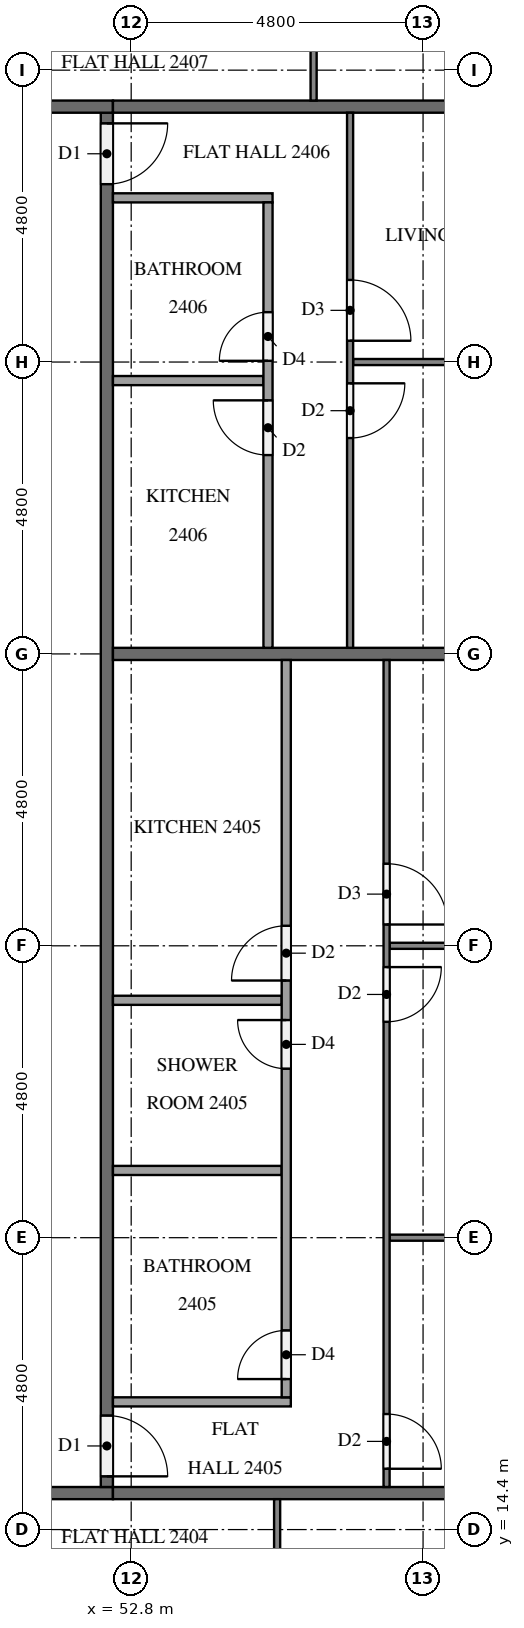
"""IFC4 building model, lengths in metres.
Left out: names, types, materials, properties, quantities, classifications, styles, units other than length and angle.
Written with IfcOpenShell. Run it as: python <this file> out.ifc"""

import sys

from ifc_helpers import new_model, si_unit, direction, frame, frame_2d, origin, place, context, subcontext, project, spatial, rectangle, extrude, element, fill, save


model = new_model("IFC4")
c1 = context("Model", 3, precision=1e-05, world=origin(), true_north=direction((0.0, 1.0)))
c2 = subcontext(c1, "Body", "Model", "MODEL_VIEW")
j1 = project(units=[si_unit("LENGTHUNIT", "METRE"), si_unit("PLANEANGLEUNIT", "RADIAN")], contexts=[c1])
p1 = place(None, origin())
s1 = spatial("IfcSite", under=j1, at=p1, CompositionType="ELEMENT")
p2 = place(p1, origin())
s2 = spatial("IfcBuilding", under=s1, at=p2, CompositionType="ELEMENT")
p3 = place(p2, frame((0.0, 0.0, 96.2)))
s3 = spatial("IfcBuildingStorey", under=s2, at=p3, CompositionType="ELEMENT", Elevation=96.2)
p4 = place(p3, frame((50.3, 15.0, 0.0), z_axis=(0.0, 0.0, 1.0), x_axis=(1.0, 0.0, 0.0)))
e1 = element("IfcWall", 1, at=p4, inside=s3, PredefinedType="PARTITIONING", context=c2, shape_type="SweptSolid", body=[
    extrude(rectangle(XDim=2.2, YDim=0.2, at=frame_2d((1.1, 0.0))), origin(), (0.0, 0.0, 1.0), 3.2),
])
p5 = place(p3, frame((52.4, 37.7, 0.0), z_axis=(0.0, 0.0, 1.0), x_axis=(0.0, -1.0, 0.0)))
e2 = element("IfcWall", 2, at=p5, inside=s3, PredefinedType="PARTITIONING", context=c2, shape_type="SweptSolid", body=[
    extrude(rectangle(XDim=22.6, YDim=0.2, at=frame_2d((11.3, 0.0))), origin(), (0.0, 0.0, 1.0), 3.2),
])
p6 = place(p5, frame((21.425, 0.0, 0.0)))
e3 = element("IfcOpeningElement", 3, at=p6, cuts=e2, PredefinedType="OPENING", context=c2, shape_type="SweptSolid", body=[
    extrude(rectangle(XDim=1.0, YDim=2.1, at=frame_2d((0.5, 1.05))), frame((0.0, 0.11, 0.0), z_axis=(0.0, -1.0, 0.0), x_axis=(1.0, 0.0, 0.0)), (0.0, 0.0, 1.0), 0.22),
])
p7 = place(p5, frame((0.175, 0.0, 0.0)))
e4 = element("IfcOpeningElement", 4, at=p7, cuts=e2, PredefinedType="OPENING", context=c2, shape_type="SweptSolid", body=[
    extrude(rectangle(XDim=1.0, YDim=2.1, at=frame_2d((0.5, 1.05))), frame((0.0, 0.11, 0.0), z_axis=(0.0, -1.0, 0.0), x_axis=(1.0, 0.0, 0.0)), (0.0, 0.0, 1.0), 0.22),
])
p8 = place(p3, frame((52.5, 37.8, 0.0), z_axis=(0.0, 0.0, 1.0), x_axis=(-1.0, 0.0, 0.0)))
e5 = element("IfcWall", 5, at=p8, inside=s3, PredefinedType="PARTITIONING", context=c2, shape_type="SweptSolid", body=[
    extrude(rectangle(XDim=2.2, YDim=0.2, at=frame_2d((1.1, 0.0))), origin(), (0.0, 0.0, 1.0), 3.2),
])
p9 = place(p3, frame((52.5, 15.0, 0.0), z_axis=(0.0, 0.0, 1.0), x_axis=(1.0, 0.0, 0.0)))
e6 = element("IfcWall", 6, at=p9, inside=s3, PredefinedType="PARTITIONING", context=c2, shape_type="SweptSolid", body=[
    extrude(rectangle(XDim=9.8, YDim=0.2, at=frame_2d((4.9, 0.0))), origin(), (0.0, 0.0, 1.0), 3.2),
])
for number, where, z_axis, x_axis in (
    (7, (52.5, 28.8, 0.0), (0.0, 0.0, 1.0), (1.0, 0.0, 0.0)),
    (8, (52.5, 37.8, 0.0), (0.0, 0.0, 1.0), (1.0, 0.0, 0.0)),
):
    element("IfcWall", number, at=place(p3, frame(where, z_axis=z_axis, x_axis=x_axis)), inside=s3, PredefinedType="PARTITIONING", context=c2, shape_type="SweptSolid", body=[
        extrude(rectangle(XDim=9.475, YDim=0.2, at=frame_2d((4.738, 0.0))), origin(), (0.0, 0.0, 1.0), 3.2),
    ])
p10 = place(p3, frame((55.2, 14.9, 0.0), z_axis=(0.0, 0.0, 1.0), x_axis=(0.0, -1.0, 0.0)))
e9 = element("IfcWall", 9, at=p10, inside=s3, PredefinedType="PARTITIONING", context=c2, shape_type="SweptSolid", body=[
    extrude(rectangle(XDim=10.0, YDim=0.1, at=frame_2d((5.0, 0.0))), origin(), (0.0, 0.0, 1.0), 3.2),
])
p11 = place(p10, frame((4.05, 0.0, 0.0)))
e10 = element("IfcOpeningElement", 10, at=p11, cuts=e9, PredefinedType="OPENING", context=c2, shape_type="SweptSolid", body=[
    extrude(rectangle(XDim=0.9, YDim=2.1, at=frame_2d((0.45, 1.05))), frame((0.0, 0.06, 0.0), z_axis=(0.0, -1.0, 0.0), x_axis=(1.0, 0.0, 0.0)), (0.0, 0.0, 1.0), 0.12),
])
p12 = place(p10, frame((5.65, 0.0, 0.0)))
e11 = element("IfcOpeningElement", 11, at=p12, cuts=e9, PredefinedType="OPENING", context=c2, shape_type="SweptSolid", body=[
    extrude(rectangle(XDim=1.0, YDim=2.1, at=frame_2d((0.5, 1.05))), frame((0.0, 0.06, 0.0), z_axis=(0.0, -1.0, 0.0), x_axis=(1.0, 0.0, 0.0)), (0.0, 0.0, 1.0), 0.12),
])
p13 = place(p3, frame((57.05, 19.2, 0.0), z_axis=(0.0, 0.0, 1.0), x_axis=(1.0, 0.0, 0.0)))
e12 = element("IfcWall", 12, at=p13, inside=s3, PredefinedType="PARTITIONING", context=c2, shape_type="SweptSolid", body=[
    extrude(rectangle(XDim=4.925, YDim=0.1, at=frame_2d((2.462, 0.0))), origin(), (0.0, 0.0, 1.0), 3.2),
])
p14 = place(p3, frame((57.05, 24.0, 0.0), z_axis=(0.0, 0.0, 1.0), x_axis=(1.0, 0.0, 0.0)))
e13 = element("IfcWall", 13, at=p14, inside=s3, PredefinedType="PARTITIONING", context=c2, shape_type="SweptSolid", body=[
    extrude(rectangle(XDim=5.25, YDim=0.1, at=frame_2d((2.625, 0.0))), origin(), (0.0, 0.0, 1.0), 3.2),
])
p15 = place(p3, frame((57.0, 28.7, 0.0), z_axis=(0.0, 0.0, 1.0), x_axis=(0.0, -1.0, 0.0)))
e14 = element("IfcWall", 14, at=p15, inside=s3, PredefinedType="PARTITIONING", context=c2, shape_type="SweptSolid", body=[
    extrude(rectangle(XDim=13.6, YDim=0.1, at=frame_2d((6.8, 0.0))), origin(), (0.0, 0.0, 1.0), 3.2),
])
p16 = place(p15, frame((12.4, 0.0, 0.0)))
e15 = element("IfcOpeningElement", 15, at=p16, cuts=e14, PredefinedType="OPENING", context=c2, shape_type="SweptSolid", body=[
    extrude(rectangle(XDim=0.9, YDim=2.1, at=frame_2d((0.45, 1.05))), frame((0.0, 0.06, 0.0), z_axis=(0.0, -1.0, 0.0), x_axis=(1.0, 0.0, 0.0)), (0.0, 0.0, 1.0), 0.12),
])
p17 = place(p15, frame((5.05, 0.0, 0.0)))
e16 = element("IfcOpeningElement", 16, at=p17, cuts=e14, PredefinedType="OPENING", context=c2, shape_type="SweptSolid", body=[
    extrude(rectangle(XDim=0.9, YDim=2.1, at=frame_2d((0.45, 1.05))), frame((0.0, 0.06, 0.0), z_axis=(0.0, -1.0, 0.0), x_axis=(1.0, 0.0, 0.0)), (0.0, 0.0, 1.0), 0.12),
])
p18 = place(p15, frame((3.35, 0.0, 0.0)))
e17 = element("IfcOpeningElement", 17, at=p18, cuts=e14, PredefinedType="OPENING", context=c2, shape_type="SweptSolid", body=[
    extrude(rectangle(XDim=1.0, YDim=2.1, at=frame_2d((0.5, 1.05))), frame((0.0, 0.06, 0.0), z_axis=(0.0, -1.0, 0.0), x_axis=(1.0, 0.0, 0.0)), (0.0, 0.0, 1.0), 0.12),
])
for number, where, z_axis, x_axis in (
    (18, (52.5, 20.306, 0.0), (0.0, 0.0, 1.0), (1.0, 0.0, 0.0)),
    (19, (52.5, 23.104, 0.0), (0.0, 0.0, 1.0), (1.0, 0.0, 0.0)),
):
    element("IfcWall", number, at=place(p3, frame(where, z_axis=z_axis, x_axis=x_axis)), inside=s3, PredefinedType="PARTITIONING", context=c2, shape_type="SweptSolid", body=[
        extrude(rectangle(XDim=2.775, YDim=0.15, at=frame_2d((1.387, 0.0))), origin(), (0.0, 0.0, 1.0), 3.2),
    ])
p19 = place(p3, frame((52.5, 16.5, 0.0), z_axis=(0.0, 0.0, 1.0), x_axis=(1.0, 0.0, 0.0)))
e20 = element("IfcWall", 20, at=p19, inside=s3, PredefinedType="PARTITIONING", context=c2, shape_type="SweptSolid", body=[
    extrude(rectangle(XDim=2.925, YDim=0.15, at=frame_2d((1.462, 0.0))), origin(), (0.0, 0.0, 1.0), 3.2),
])
p20 = place(p3, frame((55.35, 16.575, 0.0), z_axis=(0.0, 0.0, 1.0), x_axis=(0.0, 1.0, 0.0)))
e21 = element("IfcWall", 21, at=p20, inside=s3, PredefinedType="PARTITIONING", context=c2, shape_type="SweptSolid", body=[
    extrude(rectangle(XDim=12.125, YDim=0.15, at=frame_2d((6.062, 0.0))), origin(), (0.0, 0.0, 1.0), 3.2),
])
p21 = place(p20, frame((0.3, 0.0, 0.0)))
e22 = element("IfcOpeningElement", 22, at=p21, cuts=e21, PredefinedType="OPENING", context=c2, shape_type="SweptSolid", body=[
    extrude(rectangle(XDim=0.8, YDim=2.1, at=frame_2d((0.4, 1.05))), frame((0.0, 0.085, 0.0), z_axis=(0.0, -1.0, 0.0), x_axis=(1.0, 0.0, 0.0)), (0.0, 0.0, 1.0), 0.17),
])
p22 = place(p20, frame((5.404, 0.0, 0.0)))
e23 = element("IfcOpeningElement", 23, at=p22, cuts=e21, PredefinedType="OPENING", context=c2, shape_type="SweptSolid", body=[
    extrude(rectangle(XDim=0.8, YDim=2.1, at=frame_2d((0.4, 1.05))), frame((0.0, 0.085, 0.0), z_axis=(0.0, -1.0, 0.0), x_axis=(1.0, 0.0, 0.0)), (0.0, 0.0, 1.0), 0.17),
])
p23 = place(p20, frame((6.854, 0.0, 0.0)))
e24 = element("IfcOpeningElement", 24, at=p23, cuts=e21, PredefinedType="OPENING", context=c2, shape_type="SweptSolid", body=[
    extrude(rectangle(XDim=0.9, YDim=2.1, at=frame_2d((0.45, 1.05))), frame((0.0, 0.085, 0.0), z_axis=(0.0, -1.0, 0.0), x_axis=(1.0, 0.0, 0.0)), (0.0, 0.0, 1.0), 0.17),
])
p24 = place(p3, frame((56.45, 33.6, 0.0), z_axis=(0.0, 0.0, 1.0), x_axis=(1.0, 0.0, 0.0)))
e25 = element("IfcWall", 25, at=p24, inside=s3, PredefinedType="PARTITIONING", context=c2, shape_type="SweptSolid", body=[
    extrude(rectangle(XDim=5.85, YDim=0.1, at=frame_2d((2.925, 0.0))), origin(), (0.0, 0.0, 1.0), 3.2),
])
p25 = place(p3, frame((56.4, 37.7, 0.0), z_axis=(0.0, 0.0, 1.0), x_axis=(0.0, -1.0, 0.0)))
e26 = element("IfcWall", 26, at=p25, inside=s3, PredefinedType="PARTITIONING", context=c2, shape_type="SweptSolid", body=[
    extrude(rectangle(XDim=8.8, YDim=0.1, at=frame_2d((4.4, 0.0))), origin(), (0.0, 0.0, 1.0), 3.2),
])
p26 = place(p25, frame((2.75, 0.0, 0.0)))
e27 = element("IfcOpeningElement", 27, at=p26, cuts=e26, PredefinedType="OPENING", context=c2, shape_type="SweptSolid", body=[
    extrude(rectangle(XDim=1.0, YDim=2.1, at=frame_2d((0.5, 1.05))), frame((0.0, 0.06, 0.0), z_axis=(0.0, -1.0, 0.0), x_axis=(1.0, 0.0, 0.0)), (0.0, 0.0, 1.0), 0.12),
])
p27 = place(p25, frame((4.45, 0.0, 0.0)))
e28 = element("IfcOpeningElement", 28, at=p27, cuts=e26, PredefinedType="OPENING", context=c2, shape_type="SweptSolid", body=[
    extrude(rectangle(XDim=0.9, YDim=2.1, at=frame_2d((0.45, 1.05))), frame((0.0, 0.06, 0.0), z_axis=(0.0, -1.0, 0.0), x_axis=(1.0, 0.0, 0.0)), (0.0, 0.0, 1.0), 0.12),
])
p28 = place(p3, frame((52.5, 33.295, 0.0), z_axis=(0.0, 0.0, 1.0), x_axis=(1.0, 0.0, 0.0)))
e29 = element("IfcWall", 29, at=p28, inside=s3, PredefinedType="PARTITIONING", context=c2, shape_type="SweptSolid", body=[
    extrude(rectangle(XDim=2.475, YDim=0.15, at=frame_2d((1.238, 0.0))), origin(), (0.0, 0.0, 1.0), 3.2),
])
p29 = place(p3, frame((52.5, 36.3, 0.0), z_axis=(0.0, 0.0, 1.0), x_axis=(1.0, 0.0, 0.0)))
e30 = element("IfcWall", 30, at=p29, inside=s3, PredefinedType="PARTITIONING", context=c2, shape_type="SweptSolid", body=[
    extrude(rectangle(XDim=2.625, YDim=0.15, at=frame_2d((1.312, 0.0))), origin(), (0.0, 0.0, 1.0), 3.2),
])
p30 = place(p3, frame((55.05, 28.9, 0.0), z_axis=(0.0, 0.0, 1.0), x_axis=(0.0, 1.0, 0.0)))
e31 = element("IfcWall", 31, at=p30, inside=s3, PredefinedType="PARTITIONING", context=c2, shape_type="SweptSolid", body=[
    extrude(rectangle(XDim=7.325, YDim=0.15, at=frame_2d((3.663, 0.0))), origin(), (0.0, 0.0, 1.0), 3.2),
])
p31 = place(p30, frame((4.72, 0.0, 0.0)))
e32 = element("IfcOpeningElement", 32, at=p31, cuts=e31, PredefinedType="OPENING", context=c2, shape_type="SweptSolid", body=[
    extrude(rectangle(XDim=0.8, YDim=2.1, at=frame_2d((0.4, 1.05))), frame((0.0, 0.085, 0.0), z_axis=(0.0, -1.0, 0.0), x_axis=(1.0, 0.0, 0.0)), (0.0, 0.0, 1.0), 0.17),
])
p32 = place(p30, frame((3.17, 0.0, 0.0)))
e33 = element("IfcOpeningElement", 33, at=p32, cuts=e31, PredefinedType="OPENING", context=c2, shape_type="SweptSolid", body=[
    extrude(rectangle(XDim=0.9, YDim=2.1, at=frame_2d((0.45, 1.05))), frame((0.0, 0.085, 0.0), z_axis=(0.0, -1.0, 0.0), x_axis=(1.0, 0.0, 0.0)), (0.0, 0.0, 1.0), 0.17),
])
p33 = place(p3, frame((55.8, 52.7, 0.0), z_axis=(0.0, 0.0, 1.0), x_axis=(0.0, -1.0, 0.0)))
e34 = element("IfcWall", 34, at=p33, inside=s3, PredefinedType="PARTITIONING", context=c2, shape_type="SweptSolid", body=[
    extrude(rectangle(XDim=14.8, YDim=0.1, at=frame_2d((7.4, 0.0))), origin(), (0.0, 0.0, 1.0), 3.2),
])
p34 = place(p33, frame((9.85, 0.0, 0.0)))
e35 = element("IfcOpeningElement", 35, at=p34, cuts=e34, PredefinedType="OPENING", context=c2, shape_type="SweptSolid", body=[
    extrude(rectangle(XDim=0.9, YDim=2.1, at=frame_2d((0.45, 1.05))), frame((0.0, 0.06, 0.0), z_axis=(0.0, -1.0, 0.0), x_axis=(1.0, 0.0, 0.0)), (0.0, 0.0, 1.0), 0.12),
])
p35 = place(p33, frame((8.25, 0.0, 0.0)))
e36 = element("IfcOpeningElement", 36, at=p35, cuts=e34, PredefinedType="OPENING", context=c2, shape_type="SweptSolid", body=[
    extrude(rectangle(XDim=0.9, YDim=2.1, at=frame_2d((0.45, 1.05))), frame((0.0, 0.06, 0.0), z_axis=(0.0, -1.0, 0.0), x_axis=(1.0, 0.0, 0.0)), (0.0, 0.0, 1.0), 0.12),
])
p36 = place(p33, frame((0.5, 0.0, 0.0)))
e37 = element("IfcOpeningElement", 37, at=p36, cuts=e34, PredefinedType="OPENING", context=c2, shape_type="SweptSolid", body=[
    extrude(rectangle(XDim=1.0, YDim=2.1, at=frame_2d((0.5, 1.05))), frame((0.0, 0.06, 0.0), z_axis=(0.0, -1.0, 0.0), x_axis=(1.0, 0.0, 0.0)), (0.0, 0.0, 1.0), 0.12),
])
p37 = place(p6, origin())
e38 = element("IfcDoor", 38, at=p37, inside=s3, OperationType="SINGLE_SWING_RIGHT", PredefinedType="DOOR", context=c2, shape_type="SweptSolid", body=[
    extrude(rectangle(XDim=1.0, YDim=2.1, at=frame_2d((0.5, 1.05))), frame((0.0, 0.025, 0.0), z_axis=(0.0, -1.0, 0.0), x_axis=(1.0, 0.0, 0.0)), (0.0, 0.0, 1.0), 0.05),
])
fill(e3, e38)
p38 = place(p7, origin())
e39 = element("IfcDoor", 39, at=p38, inside=s3, OperationType="SINGLE_SWING_LEFT", PredefinedType="DOOR", context=c2, shape_type="SweptSolid", body=[
    extrude(rectangle(XDim=1.0, YDim=2.1, at=frame_2d((0.5, 1.05))), frame((0.0, 0.025, 0.0), z_axis=(0.0, -1.0, 0.0), x_axis=(1.0, 0.0, 0.0)), (0.0, 0.0, 1.0), 0.05),
])
fill(e4, e39)
p39 = place(p16, origin())
e40 = element("IfcDoor", 40, at=p39, inside=s3, OperationType="SINGLE_SWING_RIGHT", PredefinedType="DOOR", context=c2, shape_type="SweptSolid", body=[
    extrude(rectangle(XDim=0.9, YDim=2.1, at=frame_2d((0.45, 1.05))), frame((0.0, 0.025, 0.0), z_axis=(0.0, -1.0, 0.0), x_axis=(1.0, 0.0, 0.0)), (0.0, 0.0, 1.0), 0.05),
])
fill(e15, e40)
p40 = place(p17, origin())
e41 = element("IfcDoor", 41, at=p40, inside=s3, OperationType="SINGLE_SWING_LEFT", PredefinedType="DOOR", context=c2, shape_type="SweptSolid", body=[
    extrude(rectangle(XDim=0.9, YDim=2.1, at=frame_2d((0.45, 1.05))), frame((0.0, 0.025, 0.0), z_axis=(0.0, -1.0, 0.0), x_axis=(1.0, 0.0, 0.0)), (0.0, 0.0, 1.0), 0.05),
])
fill(e16, e41)
p41 = place(p18, origin())
e42 = element("IfcDoor", 42, at=p41, inside=s3, OperationType="SINGLE_SWING_RIGHT", PredefinedType="DOOR", context=c2, shape_type="SweptSolid", body=[
    extrude(rectangle(XDim=1.0, YDim=2.1, at=frame_2d((0.5, 1.05))), frame((0.0, 0.025, 0.0), z_axis=(0.0, -1.0, 0.0), x_axis=(1.0, 0.0, 0.0)), (0.0, 0.0, 1.0), 0.05),
])
fill(e17, e42)
p42 = place(p21, origin())
e43 = element("IfcDoor", 43, at=p42, inside=s3, OperationType="SINGLE_SWING_LEFT", PredefinedType="DOOR", context=c2, shape_type="SweptSolid", body=[
    extrude(rectangle(XDim=0.8, YDim=2.1, at=frame_2d((0.4, 1.05))), frame((0.0, 0.025, 0.0), z_axis=(0.0, -1.0, 0.0), x_axis=(1.0, 0.0, 0.0)), (0.0, 0.0, 1.0), 0.05),
])
fill(e22, e43)
p43 = place(p22, origin())
e44 = element("IfcDoor", 44, at=p43, inside=s3, OperationType="SINGLE_SWING_RIGHT", PredefinedType="DOOR", context=c2, shape_type="SweptSolid", body=[
    extrude(rectangle(XDim=0.8, YDim=2.1, at=frame_2d((0.4, 1.05))), frame((0.0, 0.025, 0.0), z_axis=(0.0, -1.0, 0.0), x_axis=(1.0, 0.0, 0.0)), (0.0, 0.0, 1.0), 0.05),
])
fill(e23, e44)
p44 = place(p23, origin())
e45 = element("IfcDoor", 45, at=p44, inside=s3, OperationType="SINGLE_SWING_LEFT", PredefinedType="DOOR", context=c2, shape_type="SweptSolid", body=[
    extrude(rectangle(XDim=0.9, YDim=2.1, at=frame_2d((0.45, 1.05))), frame((0.0, 0.025, 0.0), z_axis=(0.0, -1.0, 0.0), x_axis=(1.0, 0.0, 0.0)), (0.0, 0.0, 1.0), 0.05),
])
fill(e24, e45)
p45 = place(p26, origin())
e46 = element("IfcDoor", 46, at=p45, inside=s3, OperationType="SINGLE_SWING_RIGHT", PredefinedType="DOOR", context=c2, shape_type="SweptSolid", body=[
    extrude(rectangle(XDim=1.0, YDim=2.1, at=frame_2d((0.5, 1.05))), frame((0.0, 0.025, 0.0), z_axis=(0.0, -1.0, 0.0), x_axis=(1.0, 0.0, 0.0)), (0.0, 0.0, 1.0), 0.05),
])
fill(e27, e46)
p46 = place(p27, origin())
e47 = element("IfcDoor", 47, at=p46, inside=s3, OperationType="SINGLE_SWING_LEFT", PredefinedType="DOOR", context=c2, shape_type="SweptSolid", body=[
    extrude(rectangle(XDim=0.9, YDim=2.1, at=frame_2d((0.45, 1.05))), frame((0.0, 0.025, 0.0), z_axis=(0.0, -1.0, 0.0), x_axis=(1.0, 0.0, 0.0)), (0.0, 0.0, 1.0), 0.05),
])
fill(e28, e47)
p47 = place(p31, origin())
e48 = element("IfcDoor", 48, at=p47, inside=s3, OperationType="SINGLE_SWING_LEFT", PredefinedType="DOOR", context=c2, shape_type="SweptSolid", body=[
    extrude(rectangle(XDim=0.8, YDim=2.1, at=frame_2d((0.4, 1.05))), frame((0.0, 0.025, 0.0), z_axis=(0.0, -1.0, 0.0), x_axis=(1.0, 0.0, 0.0)), (0.0, 0.0, 1.0), 0.05),
])
fill(e32, e48)
p48 = place(p32, origin())
e49 = element("IfcDoor", 49, at=p48, inside=s3, OperationType="SINGLE_SWING_RIGHT", PredefinedType="DOOR", context=c2, shape_type="SweptSolid", body=[
    extrude(rectangle(XDim=0.9, YDim=2.1, at=frame_2d((0.45, 1.05))), frame((0.0, 0.025, 0.0), z_axis=(0.0, -1.0, 0.0), x_axis=(1.0, 0.0, 0.0)), (0.0, 0.0, 1.0), 0.05),
])
fill(e33, e49)
save(model, sys.argv[1])
